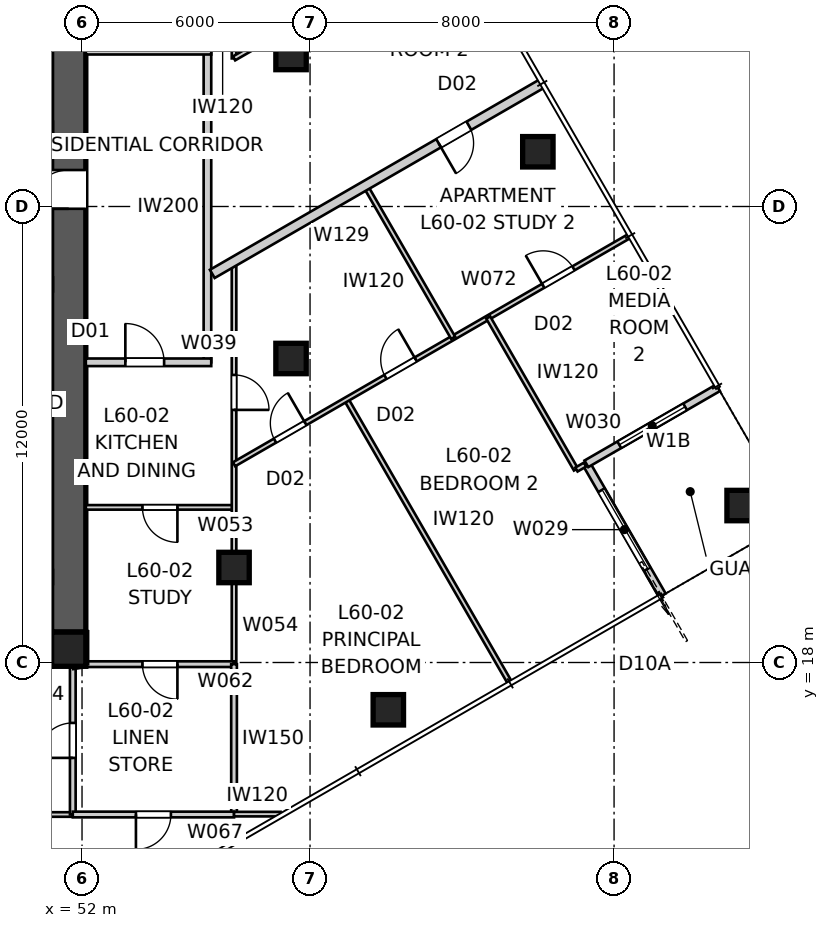
"""IFC4 building model, lengths in metres.
Left out: names, types, materials, properties, quantities, classifications, styles, units other than length and angle.
Written with IfcOpenShell. Run it as: python <this file> out.ifc"""

import sys

from ifc_helpers import new_model, si_unit, direction, frame, frame_2d, origin, origin_2d, place, context, subcontext, project, spatial, polyline, rectangle, outline, extrude, element, fill, save


model = new_model("IFC4")
c1 = context("Model", 3, precision=1e-05, world=origin(), true_north=direction((0.0, 1.0)))
c2 = subcontext(c1, "Body", "Model", "MODEL_VIEW")
j1 = project(units=[si_unit("LENGTHUNIT", "METRE"), si_unit("PLANEANGLEUNIT", "RADIAN")], contexts=[c1])
p1 = place(None, origin())
s1 = spatial("IfcSite", under=j1, at=p1, CompositionType="ELEMENT")
p2 = place(p1, origin())
s2 = spatial("IfcBuilding", under=s1, at=p2, CompositionType="ELEMENT")
p3 = place(p2, frame((0.0, 0.0, 218.4)))
s3 = spatial("IfcBuildingStorey", under=s2, at=p3, CompositionType="ELEMENT", Elevation=218.4)
p4 = place(p3, frame((51.2, 18.35, 0.0), z_axis=(0.0, 0.0, 1.0), x_axis=(-1.0, 0.0, 0.0)))
e1 = element("IfcWall", 1, at=p4, inside=s3, PredefinedType="SHEAR", context=c2, shape_type="SweptSolid", body=[
    extrude(outline(polyline([(0.0, -0.45), (22.4, -0.45), (22.4, -0.025), (22.85, -0.025), (22.85, 0.025), (22.4, 0.025), (22.4, 0.45), (0.0, 0.45), (0.0, 0.025), (-0.45, 0.025), (-0.45, -0.025), (0.0, -0.025), (0.0, -0.45)])), origin(), (0.0, 0.0, 1.0), 3.4),
])
p5 = place(p3, frame((51.65, 18.8, 0.0), z_axis=(0.0, 0.0, 1.0), x_axis=(0.0, 1.0, 0.0)))
e2 = element("IfcWall", 2, at=p5, inside=s3, PredefinedType="SHEAR", context=c2, shape_type="SweptSolid", body=[
    extrude(outline(polyline([(0.0, -0.45), (22.4, -0.45), (22.4, -0.025), (22.85, -0.025), (22.85, 0.025), (22.4, 0.025), (22.4, 0.45), (0.0, 0.45), (0.0, 0.025), (-0.45, 0.025), (-0.45, -0.025), (0.0, -0.025), (0.0, -0.45)])), origin(), (0.0, 0.0, 1.0), 3.4),
])
p6 = place(p5, frame((11.14, 0.0, 0.0)))
e3 = element("IfcOpeningElement", 3, at=p6, cuts=e2, PredefinedType="OPENING", context=c2, shape_type="SweptSolid", body=[
    extrude(rectangle(XDim=1.02, YDim=2.4, at=frame_2d((0.51, 1.2))), frame((0.0, 0.46, 0.0), z_axis=(0.0, -1.0, 0.0), x_axis=(1.0, 0.0, 0.0)), (0.0, 0.0, 1.0), 0.92),
])
p7 = place(p3, frame((51.65, 18.35, 0.0), z_axis=(0.0, 0.0, 1.0), x_axis=(1.0, 0.0, 0.0)))
e4 = element("IfcColumn", 4, at=p7, inside=s3, PredefinedType="COLUMN", context=c2, shape_type="SweptSolid", body=[
    extrude(rectangle(XDim=0.9, YDim=0.9, at=origin_2d()), origin(), (0.0, 0.0, 1.0), 3.4),
])
for number, where, z_axis, x_axis in (
    (5, (60.06, 16.755, 0.0), (0.0, 0.0, 1.0), (1.0, 0.0, 0.0)),
    (6, (69.37, 22.13, 0.0), (0.0, 0.0, 1.0), (1.0, 0.0, 0.0)),
    (7, (63.995, 31.44, 0.0), (0.0, 0.0, 1.0), (1.0, 0.0, 0.0)),
    (8, (57.5, 26.0, 0.0), (0.0, 0.0, 1.0), (1.0, 0.0, 0.0)),
    (9, (57.5, 34.0, 0.0), (0.0, 0.0, 1.0), (1.0, 0.0, 0.0)),
    (10, (56.0, 20.5, 0.0), (0.0, 0.0, 1.0), (1.0, 0.0, 0.0)),
):
    element("IfcColumn", number, at=place(p3, frame(where, z_axis=z_axis, x_axis=x_axis)), inside=s3, PredefinedType="COLUMN", context=c2, shape_type="SweptSolid", body=[
        extrude(rectangle(XDim=0.8, YDim=0.8, at=origin_2d()), origin(), (0.0, 0.0, 1.0), 3.4),
    ])
p8 = place(p3, frame((67.271, 19.764, 0.0), z_axis=(0.0, 0.0, 1.0), x_axis=(-0.49999894854, 0.866026010844, 0.0)))
e11 = element("IfcWall", 11, at=p8, inside=s3, PredefinedType="SOLIDWALL", context=c2, shape_type="SweptSolid", body=[
    extrude(rectangle(XDim=4.0, YDim=0.2, at=frame_2d((2.0, 0.0))), origin(), (0.0, 0.0, 1.0), 3.25),
])
p9 = place(p8, frame((0.8, 0.0, 0.0)))
e12 = element("IfcOpeningElement", 12, at=p9, cuts=e11, PredefinedType="OPENING", context=c2, shape_type="SweptSolid", body=[
    extrude(rectangle(XDim=2.4, YDim=2.1, at=frame_2d((1.2, 1.05))), frame((0.0, 0.11, 0.0), z_axis=(0.0, -1.0, 0.0), x_axis=(1.0, 0.0, 0.0)), (0.0, 0.0, 1.0), 0.22),
])
p10 = place(p3, frame((65.271, 23.229, 0.0), z_axis=(0.0, 0.0, 1.0), x_axis=(0.866026010844, 0.49999894854, 0.0)))
e13 = element("IfcWall", 13, at=p10, inside=s3, PredefinedType="SOLIDWALL", context=c2, shape_type="SweptSolid", body=[
    extrude(rectangle(XDim=4.0, YDim=0.2, at=frame_2d((2.0, 0.0))), origin(), (0.0, 0.0, 1.0), 3.25),
])
p11 = place(p10, frame((1.0, 0.0, 0.45)))
e14 = element("IfcOpeningElement", 14, at=p11, cuts=e13, PredefinedType="OPENING", context=c2, shape_type="SweptSolid", body=[
    extrude(rectangle(XDim=2.0, YDim=1.8, at=frame_2d((1.0, 0.9))), frame((0.0, 0.11, 0.0), z_axis=(0.0, -1.0, 0.0), x_axis=(1.0, 0.0, 0.0)), (0.0, 0.0, 1.0), 0.22),
])
p12 = place(p3, frame((55.3, 25.9, 0.0), z_axis=(0.0, 0.0, 1.0), x_axis=(0.0, 1.0, 0.0)))
e15 = element("IfcWall", 15, at=p12, inside=s3, PredefinedType="PARTITIONING", context=c2, shape_type="SweptSolid", body=[
    extrude(rectangle(XDim=8.2, YDim=0.2, at=frame_2d((4.1, 0.0))), origin(), (0.0, 0.0, 1.0), 3.25),
])
p13 = place(p3, frame((52.1, 34.1, 0.0), z_axis=(0.0, 0.0, 1.0), x_axis=(1.0, 0.0, 0.0)))
e16 = element("IfcWall", 16, at=p13, inside=s3, PredefinedType="PARTITIONING", context=c2, shape_type="SweptSolid", body=[
    extrude(rectangle(XDim=3.3, YDim=0.2, at=frame_2d((1.65, 0.0))), origin(), (0.0, 0.0, 1.0), 3.25),
])
p14 = place(p3, frame((52.1, 25.9, 0.0), z_axis=(0.0, 0.0, 1.0), x_axis=(1.0, 0.0, 0.0)))
e17 = element("IfcWall", 17, at=p14, inside=s3, PredefinedType="PARTITIONING", context=c2, shape_type="SweptSolid", body=[
    extrude(rectangle(XDim=3.3, YDim=0.2, at=frame_2d((1.65, 0.0))), origin(), (0.0, 0.0, 1.0), 3.25),
])
p15 = place(p14, frame((1.04, 0.0, 0.0)))
e18 = element("IfcOpeningElement", 18, at=p15, cuts=e17, PredefinedType="OPENING", context=c2, shape_type="SweptSolid", body=[
    extrude(rectangle(XDim=1.02, YDim=2.34, at=frame_2d((0.51, 1.17))), frame((0.0, 0.11, 0.0), z_axis=(0.0, -1.0, 0.0), x_axis=(1.0, 0.0, 0.0)), (0.0, 0.0, 1.0), 0.22),
])
p16 = place(p3, frame((64.111, 33.239, 0.0), z_axis=(0.0, 0.0, 1.0), x_axis=(-0.866024190901, -0.50000210077, 0.0)))
e19 = element("IfcWall", 19, at=p16, inside=s3, PredefinedType="PARTITIONING", context=c2, shape_type="SweptSolid", body=[
    extrude(rectangle(XDim=10.026, YDim=0.25, at=frame_2d((5.013, 0.0))), origin(), (0.0, 0.0, 1.0), 3.25),
])
p17 = place(p16, frame((2.229, 0.0, 0.0)))
e20 = element("IfcOpeningElement", 20, at=p17, cuts=e19, PredefinedType="OPENING", context=c2, shape_type="SweptSolid", body=[
    extrude(rectangle(XDim=0.92, YDim=2.34, at=frame_2d((0.46, 1.17))), frame((0.0, 0.135, 0.0), z_axis=(0.0, -1.0, 0.0), x_axis=(1.0, 0.0, 0.0)), (0.0, 0.0, 1.0), 0.27),
])
p18 = place(p3, frame((56.0, 22.083, 0.0), z_axis=(0.0, 0.0, 1.0), x_axis=(-1.0, 0.0, 0.0)))
e21 = element("IfcWall", 21, at=p18, inside=s3, PredefinedType="PARTITIONING", context=c2, shape_type="SweptSolid", body=[
    extrude(rectangle(XDim=3.9, YDim=0.12, at=frame_2d((1.95, 0.0))), origin(), (0.0, 0.0, 1.0), 3.25),
])
p19 = place(p18, frame((1.49, 0.0, 0.0)))
e22 = element("IfcOpeningElement", 22, at=p19, cuts=e21, PredefinedType="OPENING", context=c2, shape_type="SweptSolid", body=[
    extrude(rectangle(XDim=0.92, YDim=2.34, at=frame_2d((0.46, 1.17))), frame((0.0, 0.07, 0.0), z_axis=(0.0, -1.0, 0.0), x_axis=(1.0, 0.0, 0.0)), (0.0, 0.0, 1.0), 0.14),
])
p20 = place(p3, frame((56.0, 28.557, 0.0), z_axis=(0.0, 0.0, 1.0), x_axis=(0.0, -1.0, 0.0)))
e23 = element("IfcWall", 23, at=p20, inside=s3, PredefinedType="PARTITIONING", context=c2, shape_type="SweptSolid", body=[
    extrude(rectangle(XDim=10.601, YDim=0.12, at=frame_2d((5.3, 0.0))), origin(), (0.0, 0.0, 1.0), 2.55),
])
p21 = place(p20, frame((2.989, 0.0, 0.0)))
e24 = element("IfcOpeningElement", 24, at=p21, cuts=e23, PredefinedType="OPENING", context=c2, shape_type="SweptSolid", body=[
    extrude(rectangle(XDim=0.92, YDim=2.34, at=frame_2d((0.46, 1.17))), frame((0.0, 0.07, 0.0), z_axis=(0.0, -1.0, 0.0), x_axis=(1.0, 0.0, 0.0)), (0.0, 0.0, 1.0), 0.14),
])
p22 = place(p3, frame((51.757, 14.0, 0.0), z_axis=(0.0, 0.0, 1.0), x_axis=(-0.999999938148, 0.000351716958, 0.0)))
e25 = element("IfcWall", 25, at=p22, inside=s3, PredefinedType="PARTITIONING", context=c2, shape_type="SweptSolid", body=[
    extrude(rectangle(XDim=28.46, YDim=0.12, at=frame_2d((14.23, 0.0))), origin(), (0.0, 0.0, 1.0), 2.55),
])
p23 = place(p22, frame((3.82, 0.0, 0.0)))
e26 = element("IfcOpeningElement", 26, at=p23, cuts=e25, PredefinedType="OPENING", context=c2, shape_type="SweptSolid", body=[
    extrude(rectangle(XDim=0.92, YDim=2.34, at=frame_2d((0.46, 1.17))), frame((0.0, 0.07, 0.0), z_axis=(0.0, -1.0, 0.0), x_axis=(1.0, 0.0, 0.0)), (0.0, 0.0, 1.0), 0.14),
])
p24 = place(p22, frame((9.17, 0.0, 0.0)))
e27 = element("IfcOpeningElement", 27, at=p24, cuts=e25, PredefinedType="OPENING", context=c2, shape_type="SweptSolid", body=[
    extrude(rectangle(XDim=0.96, YDim=2.1, at=frame_2d((0.48, 1.05))), frame((0.0, 0.07, 0.0), z_axis=(0.0, -1.0, 0.0), x_axis=(1.0, 0.0, 0.0)), (0.0, 0.0, 1.0), 0.14),
])
p25 = place(p22, frame((13.68, 0.0, 0.0)))
e28 = element("IfcOpeningElement", 28, at=p25, cuts=e25, PredefinedType="OPENING", context=c2, shape_type="SweptSolid", body=[
    extrude(rectangle(XDim=0.96, YDim=2.1, at=frame_2d((0.48, 1.05))), frame((0.0, 0.07, 0.0), z_axis=(0.0, -1.0, 0.0), x_axis=(1.0, 0.0, 0.0)), (0.0, 0.0, 1.0), 0.14),
])
p26 = place(p22, frame((23.854, 0.0, 0.0)))
e29 = element("IfcOpeningElement", 29, at=p26, cuts=e25, PredefinedType="OPENING", context=c2, shape_type="SweptSolid", body=[
    extrude(rectangle(XDim=0.92, YDim=2.34, at=frame_2d((0.46, 1.17))), frame((0.0, 0.07, 0.0), z_axis=(0.0, -1.0, 0.0), x_axis=(1.0, 0.0, 0.0)), (0.0, 0.0, 1.0), 0.14),
])
p27 = place(p3, frame((56.0, 17.956, 0.0), z_axis=(0.0, 0.0, 1.0), x_axis=(-1.0, 0.0, 0.0)))
e30 = element("IfcWall", 30, at=p27, inside=s3, PredefinedType="SOLIDWALL", context=c2, shape_type="SweptSolid", body=[
    extrude(rectangle(XDim=3.9, YDim=0.15, at=frame_2d((1.95, 0.0))), origin(), (0.0, 0.0, 1.0), 3.25),
])
p28 = place(p27, frame((1.49, 0.0, 0.0)))
e31 = element("IfcOpeningElement", 31, at=p28, cuts=e30, PredefinedType="OPENING", context=c2, shape_type="SweptSolid", body=[
    extrude(rectangle(XDim=0.92, YDim=2.1, at=frame_2d((0.46, 1.05))), frame((0.0, 0.085, 0.0), z_axis=(0.0, -1.0, 0.0), x_axis=(1.0, 0.0, 0.0)), (0.0, 0.0, 1.0), 0.17),
])
p29 = place(p3, frame((52.1, 17.956, 0.0), z_axis=(0.0, 0.0, 1.0), x_axis=(0.0, 1.0, 0.0)))
e32 = element("IfcWall", 32, at=p29, inside=s3, PredefinedType="PARTITIONING", context=c2, shape_type="SweptSolid", body=[
    extrude(rectangle(XDim=0.864, YDim=0.12, at=frame_2d((0.432, 0.0))), origin(), (0.0, 0.0, 1.0), 3.25),
])
p30 = place(p3, frame((51.757, 14.0, 0.0), z_axis=(0.0, 0.0, 1.0), x_axis=(0.0, 1.0, 0.0)))
e33 = element("IfcWall", 33, at=p30, inside=s3, PredefinedType="SOLIDWALL", context=c2, shape_type="SweptSolid", body=[
    extrude(rectangle(XDim=3.9, YDim=0.15, at=frame_2d((1.95, 0.0))), origin(), (0.0, 0.0, 1.0), 3.25),
])
p31 = place(p30, frame((1.49, 0.0, 0.0)))
e34 = element("IfcOpeningElement", 34, at=p31, cuts=e33, PredefinedType="OPENING", context=c2, shape_type="SweptSolid", body=[
    extrude(rectangle(XDim=0.92, YDim=2.1, at=frame_2d((0.46, 1.05))), frame((0.0, 0.085, 0.0), z_axis=(0.0, -1.0, 0.0), x_axis=(1.0, 0.0, 0.0)), (0.0, 0.0, 1.0), 0.17),
])
p32 = place(p3, frame((56.0, 17.956, 0.0), z_axis=(0.0, 0.0, 1.0), x_axis=(0.0, -1.0, 0.0)))
e35 = element("IfcWall", 35, at=p32, inside=s3, PredefinedType="SOLIDWALL", context=c2, shape_type="SweptSolid", body=[
    extrude(rectangle(XDim=3.956, YDim=0.15, at=frame_2d((1.978, 0.0))), origin(), (0.0, 0.0, 1.0), 3.25),
])
p33 = place(p3, frame((56.0, 14.0, 0.0), z_axis=(0.0, 0.0, 1.0), x_axis=(-1.0, 0.0, 0.0)))
e36 = element("IfcWall", 36, at=p33, inside=s3, PredefinedType="SOLIDWALL", context=c2, shape_type="SweptSolid", body=[
    extrude(rectangle(XDim=4.243, YDim=0.15, at=frame_2d((2.122, 0.0))), origin(), (0.0, 0.0, 1.0), 3.25),
])
p34 = place(p33, frame((1.661, 0.0, 0.0)))
e37 = element("IfcOpeningElement", 37, at=p34, cuts=e36, PredefinedType="OPENING", context=c2, shape_type="SweptSolid", body=[
    extrude(rectangle(XDim=0.92, YDim=2.34, at=frame_2d((0.46, 1.17))), frame((0.0, 0.085, 0.0), z_axis=(0.0, -1.0, 0.0), x_axis=(1.0, 0.0, 0.0)), (0.0, 0.0, 1.0), 0.17),
])
p35 = place(p3, frame((58.954, 24.921, 0.0), z_axis=(0.0, 0.0, 1.0), x_axis=(0.49999898161, -0.866025991751, 0.0)))
e38 = element("IfcWall", 38, at=p35, inside=s3, PredefinedType="PARTITIONING", context=c2, shape_type="SweptSolid", body=[
    extrude(rectangle(XDim=8.585, YDim=0.12, at=frame_2d((4.292, 0.0))), origin(), (0.0, 0.0, 1.0), 3.25),
])
p36 = place(p3, frame((57.225, 14.01, 0.0), z_axis=(0.0, 0.0, 1.0), x_axis=(-1.0, 0.0, 0.0)))
e39 = element("IfcWall", 39, at=p36, inside=s3, PredefinedType="PARTITIONING", context=c2, shape_type="SweptSolid", body=[
    extrude(rectangle(XDim=1.225, YDim=0.12, at=frame_2d((0.612, 0.0))), origin(), (0.0, 0.0, 1.0), 3.25),
])
p37 = place(p3, frame((56.0, 23.216, 0.0), z_axis=(0.0, 0.0, 1.0), x_axis=(0.866023917076, 0.500002575046, 0.0)))
e40 = element("IfcWall", 40, at=p37, inside=s3, PredefinedType="PARTITIONING", context=c2, shape_type="SweptSolid", body=[
    extrude(rectangle(XDim=11.996, YDim=0.12, at=frame_2d((5.998, 0.0))), origin(), (0.0, 0.0, 1.0), 3.25),
])
p38 = place(p37, frame((1.245, 0.0, 0.0)))
e41 = element("IfcOpeningElement", 41, at=p38, cuts=e40, PredefinedType="OPENING", context=c2, shape_type="SweptSolid", body=[
    extrude(rectangle(XDim=0.92, YDim=2.34, at=frame_2d((0.46, 1.17))), frame((0.0, 0.07, 0.0), z_axis=(0.0, -1.0, 0.0), x_axis=(1.0, 0.0, 0.0)), (0.0, 0.0, 1.0), 0.14),
])
p39 = place(p37, frame((4.599, 0.0, 0.0)))
e42 = element("IfcOpeningElement", 42, at=p39, cuts=e40, PredefinedType="OPENING", context=c2, shape_type="SweptSolid", body=[
    extrude(rectangle(XDim=0.92, YDim=2.34, at=frame_2d((0.46, 1.17))), frame((0.0, 0.07, 0.0), z_axis=(0.0, -1.0, 0.0), x_axis=(1.0, 0.0, 0.0)), (0.0, 0.0, 1.0), 0.14),
])
p40 = place(p37, frame((9.394, 0.0, 0.0)))
e43 = element("IfcOpeningElement", 43, at=p40, cuts=e40, PredefinedType="OPENING", context=c2, shape_type="SweptSolid", body=[
    extrude(rectangle(XDim=0.92, YDim=2.34, at=frame_2d((0.46, 1.17))), frame((0.0, 0.07, 0.0), z_axis=(0.0, -1.0, 0.0), x_axis=(1.0, 0.0, 0.0)), (0.0, 0.0, 1.0), 0.14),
])
p41 = place(p3, frame((62.688, 27.078, 0.0), z_axis=(0.0, 0.0, 1.0), x_axis=(0.500007885066, -0.866020851292, 0.0)))
e44 = element("IfcWall", 44, at=p41, inside=s3, PredefinedType="PARTITIONING", context=c2, shape_type="SweptSolid", body=[
    extrude(rectangle(XDim=4.615, YDim=0.12, at=frame_2d((2.308, 0.0))), origin(), (0.0, 0.0, 1.0), 3.25),
])
p42 = place(p3, frame((65.01, 23.077, 0.0), z_axis=(0.0, 0.0, 1.0), x_axis=(0.865829262097, 0.500339573586, 0.0)))
e45 = element("IfcWall", 45, at=p42, inside=s3, PredefinedType="PARTITIONING", context=c2, shape_type="SweptSolid", body=[
    extrude(rectangle(XDim=0.262, YDim=0.12, at=frame_2d((0.131, 0.0))), origin(), (0.0, 0.0, 1.0), 3.25),
])
p43 = place(p3, frame((51.23, 10.549, 0.0), z_axis=(0.0, 0.0, 1.0), x_axis=(-0.500007073895, 0.866021319631, 0.0)))
e46 = element("IfcWall", 46, at=p43, inside=s3, PredefinedType="PARTITIONING", context=c2, shape_type="SweptSolid", body=[
    extrude(rectangle(XDim=3.985, YDim=0.12, at=frame_2d((1.992, 0.0))), origin(), (0.0, 0.0, 1.0), 3.25),
])
p44 = place(p3, frame((61.766, 26.545, 0.0), z_axis=(0.0, 0.0, 1.0), x_axis=(-0.499999662836, 0.866025598446, 0.0)))
e47 = element("IfcWall", 47, at=p44, inside=s3, PredefinedType="PARTITIONING", context=c2, shape_type="SweptSolid", body=[
    extrude(rectangle(XDim=4.625, YDim=0.12, at=frame_2d((2.312, 0.0))), origin(), (0.0, 0.0, 1.0), 3.25),
])
p45 = place(p3, frame((56.0, 44.578, 0.0), z_axis=(0.0, 0.0, 1.0), x_axis=(0.0, -1.0, 0.0)))
e48 = element("IfcWall", 48, at=p45, inside=s3, PredefinedType="PARTITIONING", context=c2, shape_type="SweptSolid", body=[
    extrude(rectangle(XDim=10.681, YDim=0.12, at=frame_2d((5.34, 0.0))), origin(), (0.0, 0.0, 1.0), 2.55),
])
p46 = place(p45, frame((0.77, 0.0, 0.0)))
e49 = element("IfcOpeningElement", 49, at=p46, cuts=e48, PredefinedType="OPENING", context=c2, shape_type="SweptSolid", body=[
    extrude(rectangle(XDim=0.96, YDim=2.1, at=frame_2d((0.48, 1.05))), frame((0.0, 0.07, 0.0), z_axis=(0.0, -1.0, 0.0), x_axis=(1.0, 0.0, 0.0)), (0.0, 0.0, 1.0), 0.14),
])
p47 = place(p45, frame((7.379, 0.0, 0.0)))
e50 = element("IfcOpeningElement", 50, at=p47, cuts=e48, PredefinedType="OPENING", context=c2, shape_type="SweptSolid", body=[
    extrude(rectangle(XDim=0.96, YDim=2.1, at=frame_2d((0.48, 1.05))), frame((0.0, 0.07, 0.0), z_axis=(0.0, -1.0, 0.0), x_axis=(1.0, 0.0, 0.0)), (0.0, 0.0, 1.0), 0.14),
])
p48 = place(p3, frame((56.0, 33.897, 0.0), z_axis=(0.0, 0.0, 1.0), x_axis=(0.866033470286, 0.49998602815, 0.0)))
e51 = element("IfcWall", 51, at=p48, inside=s3, PredefinedType="PARTITIONING", context=c2, shape_type="SweptSolid", body=[
    extrude(rectangle(XDim=6.655, YDim=0.12, at=frame_2d((3.328, 0.0))), origin(), (0.0, 0.0, 1.0), 3.25),
])
p49 = place(p48, frame((2.887, 0.0, 0.0)))
e52 = element("IfcOpeningElement", 52, at=p49, cuts=e51, PredefinedType="OPENING", context=c2, shape_type="SweptSolid", body=[
    extrude(rectangle(XDim=0.92, YDim=2.34, at=frame_2d((0.46, 1.17))), frame((0.0, 0.07, 0.0), z_axis=(0.0, -1.0, 0.0), x_axis=(1.0, 0.0, 0.0)), (0.0, 0.0, 1.0), 0.14),
])
p50 = place(p3, frame((51.757, 17.9, 0.0), z_axis=(0.0, 0.0, 1.0), x_axis=(0.986864404584, 0.161550756622, 0.0)))
e53 = element("IfcWall", 53, at=p50, inside=s3, PredefinedType="SOLIDWALL", context=c2, shape_type="SweptSolid", body=[
    extrude(rectangle(XDim=0.348, YDim=0.15, at=frame_2d((0.174, 0.0))), origin(), (0.0, 0.0, 1.0), 3.25),
])
p51 = place(p9, origin())
e54 = element("IfcDoor", 54, at=p51, inside=s3, OperationType="SLIDING_TO_LEFT", PredefinedType="DOOR", context=c2, shape_type="SweptSolid", body=[
    extrude(rectangle(XDim=2.4, YDim=2.1, at=frame_2d((1.2, 1.05))), frame((0.0, 0.025, 0.0), z_axis=(0.0, -1.0, 0.0), x_axis=(1.0, 0.0, 0.0)), (0.0, 0.0, 1.0), 0.05),
])
fill(e12, e54)
p52 = place(p11, origin())
e55 = element("IfcWindow", 55, at=p52, inside=s3, PartitioningType="SINGLE_PANEL", PredefinedType="WINDOW", context=c2, shape_type="SweptSolid", body=[
    extrude(rectangle(XDim=2.0, YDim=1.8, at=frame_2d((1.0, 0.9))), frame((0.0, 0.03, 0.0), z_axis=(0.0, -1.0, 0.0), x_axis=(1.0, 0.0, 0.0)), (0.0, 0.0, 1.0), 0.06),
])
fill(e14, e55)
p53 = place(p15, origin())
e56 = element("IfcDoor", 56, at=p53, inside=s3, OperationType="SINGLE_SWING_LEFT", PredefinedType="DOOR", context=c2, shape_type="SweptSolid", body=[
    extrude(rectangle(XDim=1.02, YDim=2.34, at=frame_2d((0.51, 1.17))), frame((0.0, 0.025, 0.0), z_axis=(0.0, -1.0, 0.0), x_axis=(1.0, 0.0, 0.0)), (0.0, 0.0, 1.0), 0.05),
])
fill(e18, e56)
p54 = place(p21, origin())
e57 = element("IfcDoor", 57, at=p54, inside=s3, OperationType="SINGLE_SWING_RIGHT", PredefinedType="DOOR", context=c2, shape_type="SweptSolid", body=[
    extrude(rectangle(XDim=0.92, YDim=2.34, at=frame_2d((0.46, 1.17))), frame((0.0, 0.025, 0.0), z_axis=(0.0, -1.0, 0.0), x_axis=(1.0, 0.0, 0.0)), (0.0, 0.0, 1.0), 0.05),
])
fill(e24, e57)
p55 = place(p19, origin())
e58 = element("IfcDoor", 58, at=p55, inside=s3, OperationType="SINGLE_SWING_LEFT", PredefinedType="DOOR", context=c2, shape_type="SweptSolid", body=[
    extrude(rectangle(XDim=0.92, YDim=2.34, at=frame_2d((0.46, 1.17))), frame((0.0, 0.025, 0.0), z_axis=(0.0, -1.0, 0.0), x_axis=(1.0, 0.0, 0.0)), (0.0, 0.0, 1.0), 0.05),
])
fill(e22, e58)
p56 = place(p17, origin())
e59 = element("IfcDoor", 59, at=p56, inside=s3, OperationType="SINGLE_SWING_RIGHT", PredefinedType="DOOR", context=c2, shape_type="SweptSolid", body=[
    extrude(rectangle(XDim=0.92, YDim=2.34, at=frame_2d((0.46, 1.17))), frame((0.0, 0.025, 0.0), z_axis=(0.0, -1.0, 0.0), x_axis=(1.0, 0.0, 0.0)), (0.0, 0.0, 1.0), 0.05),
])
fill(e20, e59)
p57 = place(p38, origin())
e60 = element("IfcDoor", 60, at=p57, inside=s3, OperationType="SINGLE_SWING_RIGHT", PredefinedType="DOOR", context=c2, shape_type="SweptSolid", body=[
    extrude(rectangle(XDim=0.92, YDim=2.34, at=frame_2d((0.46, 1.17))), frame((0.0, 0.025, 0.0), z_axis=(0.0, -1.0, 0.0), x_axis=(1.0, 0.0, 0.0)), (0.0, 0.0, 1.0), 0.05),
])
fill(e41, e60)
p58 = place(p39, origin())
e61 = element("IfcDoor", 61, at=p58, inside=s3, OperationType="SINGLE_SWING_RIGHT", PredefinedType="DOOR", context=c2, shape_type="SweptSolid", body=[
    extrude(rectangle(XDim=0.92, YDim=2.34, at=frame_2d((0.46, 1.17))), frame((0.0, 0.025, 0.0), z_axis=(0.0, -1.0, 0.0), x_axis=(1.0, 0.0, 0.0)), (0.0, 0.0, 1.0), 0.05),
])
fill(e42, e61)
p59 = place(p28, origin())
e62 = element("IfcDoor", 62, at=p59, inside=s3, OperationType="SINGLE_SWING_LEFT", PredefinedType="DOOR", context=c2, shape_type="SweptSolid", body=[
    extrude(rectangle(XDim=0.92, YDim=2.1, at=frame_2d((0.46, 1.05))), frame((0.0, 0.025, 0.0), z_axis=(0.0, -1.0, 0.0), x_axis=(1.0, 0.0, 0.0)), (0.0, 0.0, 1.0), 0.05),
])
fill(e31, e62)
p60 = place(p40, origin())
e63 = element("IfcDoor", 63, at=p60, inside=s3, OperationType="SINGLE_SWING_LEFT", PredefinedType="DOOR", context=c2, shape_type="SweptSolid", body=[
    extrude(rectangle(XDim=0.92, YDim=2.34, at=frame_2d((0.46, 1.17))), frame((0.0, 0.025, 0.0), z_axis=(0.0, -1.0, 0.0), x_axis=(1.0, 0.0, 0.0)), (0.0, 0.0, 1.0), 0.05),
])
fill(e43, e63)
p61 = place(p34, origin())
e64 = element("IfcDoor", 64, at=p61, inside=s3, OperationType="SINGLE_SWING_RIGHT", PredefinedType="DOOR", context=c2, shape_type="SweptSolid", body=[
    extrude(rectangle(XDim=0.92, YDim=2.34, at=frame_2d((0.46, 1.17))), frame((0.0, 0.025, 0.0), z_axis=(0.0, -1.0, 0.0), x_axis=(1.0, 0.0, 0.0)), (0.0, 0.0, 1.0), 0.05),
])
fill(e37, e64)
p62 = place(p31, origin())
e65 = element("IfcDoor", 65, at=p62, inside=s3, OperationType="SINGLE_SWING_LEFT", PredefinedType="DOOR", context=c2, shape_type="SweptSolid", body=[
    extrude(rectangle(XDim=0.92, YDim=2.1, at=frame_2d((0.46, 1.05))), frame((0.0, 0.025, 0.0), z_axis=(0.0, -1.0, 0.0), x_axis=(1.0, 0.0, 0.0)), (0.0, 0.0, 1.0), 0.05),
])
fill(e34, e65)
p63 = place(p6, origin())
e66 = element("IfcDoor", 66, at=p63, inside=s3, OperationType="SINGLE_SWING_LEFT", PredefinedType="DOOR", context=c2, shape_type="SweptSolid", body=[
    extrude(rectangle(XDim=1.02, YDim=2.4, at=frame_2d((0.51, 1.2))), frame((0.0, 0.025, 0.0), z_axis=(0.0, -1.0, 0.0), x_axis=(1.0, 0.0, 0.0)), (0.0, 0.0, 1.0), 0.05),
])
fill(e3, e66)
save(model, sys.argv[1])
